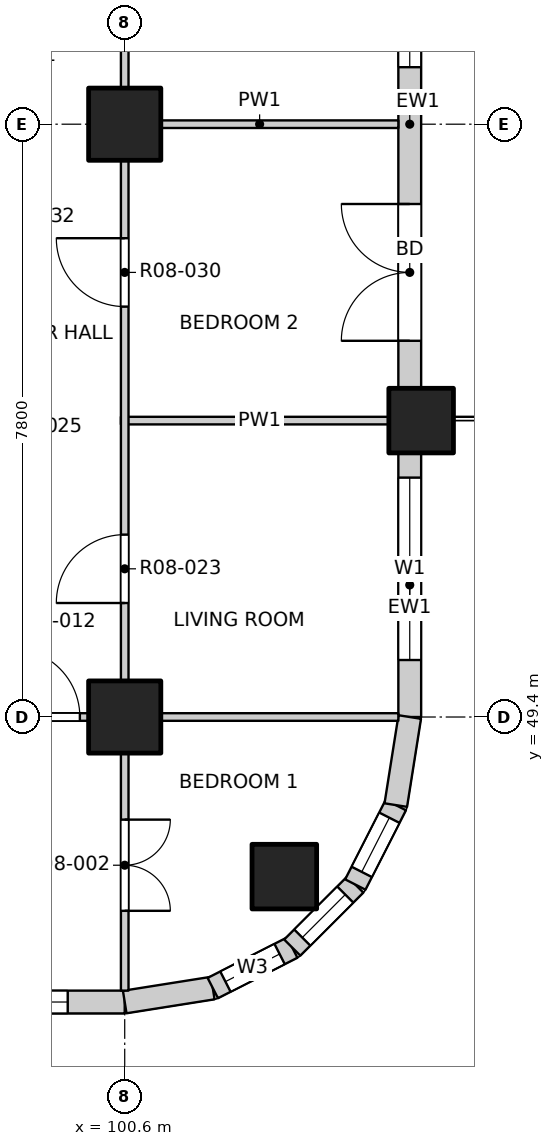
"""IFC4 building model, lengths in metres.
Left out: names, types, materials, properties, quantities, classifications, styles, units other than length and angle.
Written with IfcOpenShell. Run it as: python <this file> out.ifc"""

import sys

from ifc_helpers import new_model, si_unit, direction, frame, frame_2d, origin, origin_2d, place, context, subcontext, project, spatial, rectangle, extrude, element, fill, save


model = new_model("IFC4")
c1 = context("Model", 3, precision=1e-05, world=origin(), true_north=direction((0.0, 1.0)))
c2 = subcontext(c1, "Body", "Model", "MODEL_VIEW")
j1 = project(units=[si_unit("LENGTHUNIT", "METRE"), si_unit("PLANEANGLEUNIT", "RADIAN")], contexts=[c1])
p1 = place(None, origin())
s1 = spatial("IfcSite", under=j1, at=p1, CompositionType="ELEMENT")
p2 = place(p1, origin())
s2 = spatial("IfcBuilding", under=s1, at=p2, CompositionType="ELEMENT")
p3 = place(p2, frame((0.0, 0.0, 103.3)))
s3 = spatial("IfcBuildingStorey", under=s2, at=p3, CompositionType="ELEMENT", Elevation=103.3)
for number, where, z_axis, x_axis in (
    (1, (102.7, 47.3, -0.25), (0.0, 0.0, 1.0), (1.0, 0.0, 0.0)),
    (2, (104.5, 53.3, -0.25), (0.0, 0.0, 1.0), (1.0, 0.0, 0.0)),
):
    element("IfcColumn", number, at=place(p3, frame(where, z_axis=z_axis, x_axis=x_axis)), inside=s3, PredefinedType="COLUMN", context=c2, shape_type="SweptSolid", body=[
        extrude(rectangle(XDim=0.85, YDim=0.85, at=origin_2d()), origin(), (0.0, 0.0, 1.0), 3.4),
    ])
for number, where, z_axis, x_axis in (
    (3, (100.6, 49.4, -0.25), (0.0, 0.0, 1.0), (1.0, 0.0, 0.0)),
    (4, (100.6, 57.2, -0.25), (0.0, 0.0, 1.0), (1.0, 0.0, 0.0)),
):
    element("IfcColumn", number, at=place(p3, frame(where, z_axis=z_axis, x_axis=x_axis)), inside=s3, PredefinedType="COLUMN", context=c2, shape_type="SweptSolid", body=[
        extrude(rectangle(XDim=0.95, YDim=0.95, at=origin_2d()), origin(), (0.0, 0.0, 1.0), 3.4),
    ])
p4 = place(p3, frame((97.125, 45.65, 0.0), z_axis=(0.0, 0.0, 1.0), x_axis=(1.0, 0.0, 0.0)))
e5 = element("IfcWall", 5, at=p4, inside=s3, PredefinedType="SOLIDWALL", context=c2, shape_type="SweptSolid", body=[
    extrude(rectangle(XDim=3.475, YDim=0.3, at=frame_2d((1.738, 0.0))), origin(), (0.0, 0.0, 1.0), 2.7),
])
p5 = place(p4, frame((0.325, 0.0, 0.9)))
e6 = element("IfcOpeningElement", 6, at=p5, cuts=e5, PredefinedType="OPENING", context=c2, shape_type="SweptSolid", body=[
    extrude(rectangle(XDim=2.4, YDim=1.8, at=frame_2d((1.2, 0.9))), frame((0.0, 0.16, 0.0), z_axis=(0.0, -1.0, 0.0), x_axis=(1.0, 0.0, 0.0)), (0.0, 0.0, 1.0), 0.32),
])
p6 = place(p3, frame((104.35, 49.4, 0.0), z_axis=(0.0, 0.0, 1.0), x_axis=(0.0, 1.0, 0.0)))
e7 = element("IfcWall", 7, at=p6, inside=s3, PredefinedType="SOLIDWALL", context=c2, shape_type="SweptSolid", body=[
    extrude(rectangle(XDim=3.475, YDim=0.3, at=frame_2d((1.738, 0.0))), origin(), (0.0, 0.0, 1.0), 2.7),
])
p7 = place(p6, frame((0.75, 0.0, 0.9)))
e8 = element("IfcOpeningElement", 8, at=p7, cuts=e7, PredefinedType="OPENING", context=c2, shape_type="SweptSolid", body=[
    extrude(rectangle(XDim=2.4, YDim=1.8, at=frame_2d((1.2, 0.9))), frame((0.0, 0.16, 0.0), z_axis=(0.0, -1.0, 0.0), x_axis=(1.0, 0.0, 0.0)), (0.0, 0.0, 1.0), 0.32),
])
p8 = place(p3, frame((104.35, 53.725, 0.0), z_axis=(0.0, 0.0, 1.0), x_axis=(0.0, 1.0, 0.0)))
e9 = element("IfcWall", 9, at=p8, inside=s3, PredefinedType="SOLIDWALL", context=c2, shape_type="SweptSolid", body=[
    extrude(rectangle(XDim=6.95, YDim=0.3, at=frame_2d((3.475, 0.0))), origin(), (0.0, 0.0, 1.0), 2.7),
])
p9 = place(p8, frame((0.625, 0.0, 0.0)))
e10 = element("IfcOpeningElement", 10, at=p9, cuts=e9, PredefinedType="OPENING", context=c2, shape_type="SweptSolid", body=[
    extrude(rectangle(XDim=1.8, YDim=2.4, at=frame_2d((0.9, 1.2))), frame((0.0, 0.16, 0.0), z_axis=(0.0, -1.0, 0.0), x_axis=(1.0, 0.0, 0.0)), (0.0, 0.0, 1.0), 0.32),
])
p10 = place(p8, frame((4.225, 0.0, 0.9)))
e11 = element("IfcOpeningElement", 11, at=p10, cuts=e9, PredefinedType="OPENING", context=c2, shape_type="SweptSolid", body=[
    extrude(rectangle(XDim=2.4, YDim=1.8, at=frame_2d((1.2, 0.9))), frame((0.0, 0.16, 0.0), z_axis=(0.0, -1.0, 0.0), x_axis=(1.0, 0.0, 0.0)), (0.0, 0.0, 1.0), 0.32),
])
p11 = place(p3, frame((100.6, 45.65, 0.0), z_axis=(0.0, 0.0, 1.0), x_axis=(0.987678452879, 0.156496880861, 0.0)))
e12 = element("IfcWall", 12, at=p11, inside=s3, PredefinedType="SOLIDWALL", context=c2, shape_type="SweptSolid", body=[
    extrude(rectangle(XDim=1.173, YDim=0.3, at=frame_2d((0.586, 0.0))), origin(), (0.0, 0.0, 1.0), 2.7),
])
p12 = place(p3, frame((101.759, 45.833, 0.0), z_axis=(0.0, 0.0, 1.0), x_axis=(0.890988677504, 0.454025524128, 0.0)))
e13 = element("IfcWall", 13, at=p12, inside=s3, PredefinedType="SOLIDWALL", context=c2, shape_type="SweptSolid", body=[
    extrude(rectangle(XDim=1.173, YDim=0.3, at=frame_2d((0.587, 0.0))), origin(), (0.0, 0.0, 1.0), 2.7),
])
p13 = place(p12, frame((0.187, 0.0, 0.9)))
e14 = element("IfcOpeningElement", 14, at=p13, cuts=e13, PredefinedType="OPENING", context=c2, shape_type="SweptSolid", body=[
    extrude(rectangle(XDim=0.8, YDim=1.2, at=frame_2d((0.4, 0.6))), frame((0.0, 0.16, 0.0), z_axis=(0.0, -1.0, 0.0), x_axis=(1.0, 0.0, 0.0)), (0.0, 0.0, 1.0), 0.32),
])
p14 = place(p3, frame((102.804, 46.366, 0.0), z_axis=(0.0, 0.0, 1.0), x_axis=(0.707106781187, 0.707106781187, 0.0)))
e15 = element("IfcWall", 15, at=p14, inside=s3, PredefinedType="SOLIDWALL", context=c2, shape_type="SweptSolid", body=[
    extrude(rectangle(XDim=1.173, YDim=0.3, at=frame_2d((0.586, 0.0))), origin(), (0.0, 0.0, 1.0), 2.7),
])
p15 = place(p14, frame((0.187, 0.0, 0.9)))
e16 = element("IfcOpeningElement", 16, at=p15, cuts=e15, PredefinedType="OPENING", context=c2, shape_type="SweptSolid", body=[
    extrude(rectangle(XDim=0.8, YDim=1.2, at=frame_2d((0.4, 0.6))), frame((0.0, 0.16, 0.0), z_axis=(0.0, -1.0, 0.0), x_axis=(1.0, 0.0, 0.0)), (0.0, 0.0, 1.0), 0.32),
])
p16 = place(p3, frame((103.634, 47.196, 0.0), z_axis=(0.0, 0.0, 1.0), x_axis=(0.454025524128, 0.890988677504, 0.0)))
e17 = element("IfcWall", 17, at=p16, inside=s3, PredefinedType="SOLIDWALL", context=c2, shape_type="SweptSolid", body=[
    extrude(rectangle(XDim=1.173, YDim=0.3, at=frame_2d((0.587, 0.0))), origin(), (0.0, 0.0, 1.0), 2.7),
])
p17 = place(p16, frame((0.187, 0.0, 0.9)))
e18 = element("IfcOpeningElement", 18, at=p17, cuts=e17, PredefinedType="OPENING", context=c2, shape_type="SweptSolid", body=[
    extrude(rectangle(XDim=0.8, YDim=1.2, at=frame_2d((0.4, 0.6))), frame((0.0, 0.16, 0.0), z_axis=(0.0, -1.0, 0.0), x_axis=(1.0, 0.0, 0.0)), (0.0, 0.0, 1.0), 0.32),
])
p18 = place(p3, frame((104.167, 48.241, 0.0), z_axis=(0.0, 0.0, 1.0), x_axis=(0.156496880861, 0.987678452879, 0.0)))
e19 = element("IfcWall", 19, at=p18, inside=s3, PredefinedType="SOLIDWALL", context=c2, shape_type="SweptSolid", body=[
    extrude(rectangle(XDim=1.173, YDim=0.3, at=frame_2d((0.586, 0.0))), origin(), (0.0, 0.0, 1.0), 2.7),
])
p19 = place(p3, frame((65.8, 49.4, 0.0), z_axis=(0.0, 0.0, 1.0), x_axis=(1.0, 0.0, 0.0)))
e20 = element("IfcWall", 20, at=p19, inside=s3, PredefinedType="PARTITIONING", context=c2, shape_type="SweptSolid", body=[
    extrude(rectangle(XDim=38.4, YDim=0.1, at=frame_2d((19.2, 0.0))), origin(), (0.0, 0.0, 1.0), 3.15),
])
p20 = place(p19, frame((4.19, 0.0, 0.0)))
e21 = element("IfcOpeningElement", 21, at=p20, cuts=e20, PredefinedType="OPENING", context=c2, shape_type="SweptSolid", body=[
    extrude(rectangle(XDim=0.9, YDim=2.1, at=frame_2d((0.45, 1.05))), frame((0.0, 0.06, 0.0), z_axis=(0.0, -1.0, 0.0), x_axis=(1.0, 0.0, 0.0)), (0.0, 0.0, 1.0), 0.12),
])
p21 = place(p19, frame((9.0, 0.0, 0.0)))
e22 = element("IfcOpeningElement", 22, at=p21, cuts=e20, PredefinedType="OPENING", context=c2, shape_type="SweptSolid", body=[
    extrude(rectangle(XDim=0.9, YDim=2.1, at=frame_2d((0.45, 1.05))), frame((0.0, 0.06, 0.0), z_axis=(0.0, -1.0, 0.0), x_axis=(1.0, 0.0, 0.0)), (0.0, 0.0, 1.0), 0.12),
])
p22 = place(p19, frame((12.9, 0.0, 0.0)))
e23 = element("IfcOpeningElement", 23, at=p22, cuts=e20, PredefinedType="OPENING", context=c2, shape_type="SweptSolid", body=[
    extrude(rectangle(XDim=0.9, YDim=2.1, at=frame_2d((0.45, 1.05))), frame((0.0, 0.06, 0.0), z_axis=(0.0, -1.0, 0.0), x_axis=(1.0, 0.0, 0.0)), (0.0, 0.0, 1.0), 0.12),
])
p23 = place(p19, frame((16.8, 0.0, 0.0)))
e24 = element("IfcOpeningElement", 24, at=p23, cuts=e20, PredefinedType="OPENING", context=c2, shape_type="SweptSolid", body=[
    extrude(rectangle(XDim=0.9, YDim=2.1, at=frame_2d((0.45, 1.05))), frame((0.0, 0.06, 0.0), z_axis=(0.0, -1.0, 0.0), x_axis=(1.0, 0.0, 0.0)), (0.0, 0.0, 1.0), 0.12),
])
p24 = place(p19, frame((20.7, 0.0, 0.0)))
e25 = element("IfcOpeningElement", 25, at=p24, cuts=e20, PredefinedType="OPENING", context=c2, shape_type="SweptSolid", body=[
    extrude(rectangle(XDim=0.9, YDim=2.1, at=frame_2d((0.45, 1.05))), frame((0.0, 0.06, 0.0), z_axis=(0.0, -1.0, 0.0), x_axis=(1.0, 0.0, 0.0)), (0.0, 0.0, 1.0), 0.12),
])
p25 = place(p19, frame((24.6, 0.0, 0.0)))
e26 = element("IfcOpeningElement", 26, at=p25, cuts=e20, PredefinedType="OPENING", context=c2, shape_type="SweptSolid", body=[
    extrude(rectangle(XDim=0.9, YDim=2.1, at=frame_2d((0.45, 1.05))), frame((0.0, 0.06, 0.0), z_axis=(0.0, -1.0, 0.0), x_axis=(1.0, 0.0, 0.0)), (0.0, 0.0, 1.0), 0.12),
])
p26 = place(p19, frame((28.5, 0.0, 0.0)))
e27 = element("IfcOpeningElement", 27, at=p26, cuts=e20, PredefinedType="OPENING", context=c2, shape_type="SweptSolid", body=[
    extrude(rectangle(XDim=0.9, YDim=2.1, at=frame_2d((0.45, 1.05))), frame((0.0, 0.06, 0.0), z_axis=(0.0, -1.0, 0.0), x_axis=(1.0, 0.0, 0.0)), (0.0, 0.0, 1.0), 0.12),
])
p27 = place(p19, frame((33.31, 0.0, 0.0)))
e28 = element("IfcOpeningElement", 28, at=p27, cuts=e20, PredefinedType="OPENING", context=c2, shape_type="SweptSolid", body=[
    extrude(rectangle(XDim=0.9, YDim=2.1, at=frame_2d((0.45, 1.05))), frame((0.0, 0.06, 0.0), z_axis=(0.0, -1.0, 0.0), x_axis=(1.0, 0.0, 0.0)), (0.0, 0.0, 1.0), 0.12),
])
for number, where, z_axis, x_axis in (
    (29, (100.55, 53.3, 0.0), (0.0, 0.0, 1.0), (1.0, 0.0, 0.0)),
    (30, (100.55, 57.2, 0.0), (0.0, 0.0, 1.0), (1.0, 0.0, 0.0)),
):
    element("IfcWall", number, at=place(p3, frame(where, z_axis=z_axis, x_axis=x_axis)), inside=s3, PredefinedType="PARTITIONING", context=c2, shape_type="SweptSolid", body=[
        extrude(rectangle(XDim=3.65, YDim=0.1, at=frame_2d((1.825, 0.0))), origin(), (0.0, 0.0, 1.0), 3.15),
    ])
p28 = place(p3, frame((100.6, 45.8, 0.0), z_axis=(0.0, 0.0, 1.0), x_axis=(0.0, 1.0, 0.0)))
e31 = element("IfcWall", 31, at=p28, inside=s3, PredefinedType="PARTITIONING", context=c2, shape_type="SweptSolid", body=[
    extrude(rectangle(XDim=38.4, YDim=0.1, at=frame_2d((19.2, 0.0))), origin(), (0.0, 0.0, 1.0), 3.15),
])
p29 = place(p28, frame((1.05, 0.0, 0.0)))
e32 = element("IfcOpeningElement", 32, at=p29, cuts=e31, PredefinedType="OPENING", context=c2, shape_type="SweptSolid", body=[
    extrude(rectangle(XDim=1.2, YDim=2.1, at=frame_2d((0.6, 1.05))), frame((0.0, 0.06, 0.0), z_axis=(0.0, -1.0, 0.0), x_axis=(1.0, 0.0, 0.0)), (0.0, 0.0, 1.0), 0.12),
])
p30 = place(p28, frame((5.1, 0.0, 0.0)))
e33 = element("IfcOpeningElement", 33, at=p30, cuts=e31, PredefinedType="OPENING", context=c2, shape_type="SweptSolid", body=[
    extrude(rectangle(XDim=0.9, YDim=2.1, at=frame_2d((0.45, 1.05))), frame((0.0, 0.06, 0.0), z_axis=(0.0, -1.0, 0.0), x_axis=(1.0, 0.0, 0.0)), (0.0, 0.0, 1.0), 0.12),
])
p31 = place(p28, frame((9.0, 0.0, 0.0)))
e34 = element("IfcOpeningElement", 34, at=p31, cuts=e31, PredefinedType="OPENING", context=c2, shape_type="SweptSolid", body=[
    extrude(rectangle(XDim=0.9, YDim=2.1, at=frame_2d((0.45, 1.05))), frame((0.0, 0.06, 0.0), z_axis=(0.0, -1.0, 0.0), x_axis=(1.0, 0.0, 0.0)), (0.0, 0.0, 1.0), 0.12),
])
p32 = place(p28, frame((12.9, 0.0, 0.0)))
e35 = element("IfcOpeningElement", 35, at=p32, cuts=e31, PredefinedType="OPENING", context=c2, shape_type="SweptSolid", body=[
    extrude(rectangle(XDim=0.9, YDim=2.1, at=frame_2d((0.45, 1.05))), frame((0.0, 0.06, 0.0), z_axis=(0.0, -1.0, 0.0), x_axis=(1.0, 0.0, 0.0)), (0.0, 0.0, 1.0), 0.12),
])
p33 = place(p28, frame((16.8, 0.0, 0.0)))
e36 = element("IfcOpeningElement", 36, at=p33, cuts=e31, PredefinedType="OPENING", context=c2, shape_type="SweptSolid", body=[
    extrude(rectangle(XDim=0.9, YDim=2.1, at=frame_2d((0.45, 1.05))), frame((0.0, 0.06, 0.0), z_axis=(0.0, -1.0, 0.0), x_axis=(1.0, 0.0, 0.0)), (0.0, 0.0, 1.0), 0.12),
])
p34 = place(p28, frame((20.7, 0.0, 0.0)))
e37 = element("IfcOpeningElement", 37, at=p34, cuts=e31, PredefinedType="OPENING", context=c2, shape_type="SweptSolid", body=[
    extrude(rectangle(XDim=0.9, YDim=2.1, at=frame_2d((0.45, 1.05))), frame((0.0, 0.06, 0.0), z_axis=(0.0, -1.0, 0.0), x_axis=(1.0, 0.0, 0.0)), (0.0, 0.0, 1.0), 0.12),
])
p35 = place(p28, frame((24.6, 0.0, 0.0)))
e38 = element("IfcOpeningElement", 38, at=p35, cuts=e31, PredefinedType="OPENING", context=c2, shape_type="SweptSolid", body=[
    extrude(rectangle(XDim=0.9, YDim=2.1, at=frame_2d((0.45, 1.05))), frame((0.0, 0.06, 0.0), z_axis=(0.0, -1.0, 0.0), x_axis=(1.0, 0.0, 0.0)), (0.0, 0.0, 1.0), 0.12),
])
p36 = place(p28, frame((28.5, 0.0, 0.0)))
e39 = element("IfcOpeningElement", 39, at=p36, cuts=e31, PredefinedType="OPENING", context=c2, shape_type="SweptSolid", body=[
    extrude(rectangle(XDim=0.9, YDim=2.1, at=frame_2d((0.45, 1.05))), frame((0.0, 0.06, 0.0), z_axis=(0.0, -1.0, 0.0), x_axis=(1.0, 0.0, 0.0)), (0.0, 0.0, 1.0), 0.12),
])
p37 = place(p28, frame((32.4, 0.0, 0.0)))
e40 = element("IfcOpeningElement", 40, at=p37, cuts=e31, PredefinedType="OPENING", context=c2, shape_type="SweptSolid", body=[
    extrude(rectangle(XDim=0.9, YDim=2.1, at=frame_2d((0.45, 1.05))), frame((0.0, 0.06, 0.0), z_axis=(0.0, -1.0, 0.0), x_axis=(1.0, 0.0, 0.0)), (0.0, 0.0, 1.0), 0.12),
])
p38 = place(p28, frame((36.15, 0.0, 0.0)))
e41 = element("IfcOpeningElement", 41, at=p38, cuts=e31, PredefinedType="OPENING", context=c2, shape_type="SweptSolid", body=[
    extrude(rectangle(XDim=1.2, YDim=2.1, at=frame_2d((0.6, 1.05))), frame((0.0, 0.06, 0.0), z_axis=(0.0, -1.0, 0.0), x_axis=(1.0, 0.0, 0.0)), (0.0, 0.0, 1.0), 0.12),
])
p39 = place(p5, origin())
e42 = element("IfcWindow", 42, at=p39, inside=s3, PartitioningType="DOUBLE_PANEL_VERTICAL", PredefinedType="WINDOW", context=c2, shape_type="SweptSolid", body=[
    extrude(rectangle(XDim=2.4, YDim=1.8, at=frame_2d((1.2, 0.9))), frame((0.0, 0.03, 0.0), z_axis=(0.0, -1.0, 0.0), x_axis=(1.0, 0.0, 0.0)), (0.0, 0.0, 1.0), 0.06),
])
fill(e6, e42)
p40 = place(p7, origin())
e43 = element("IfcWindow", 43, at=p40, inside=s3, PartitioningType="DOUBLE_PANEL_VERTICAL", PredefinedType="WINDOW", context=c2, shape_type="SweptSolid", body=[
    extrude(rectangle(XDim=2.4, YDim=1.8, at=frame_2d((1.2, 0.9))), frame((0.0, 0.03, 0.0), z_axis=(0.0, -1.0, 0.0), x_axis=(1.0, 0.0, 0.0)), (0.0, 0.0, 1.0), 0.06),
])
fill(e8, e43)
p41 = place(p9, origin())
e44 = element("IfcDoor", 44, at=p41, inside=s3, OperationType="DOUBLE_DOOR_SINGLE_SWING", PredefinedType="DOOR", context=c2, shape_type="SweptSolid", body=[
    extrude(rectangle(XDim=1.8, YDim=2.4, at=frame_2d((0.9, 1.2))), frame((0.0, 0.025, 0.0), z_axis=(0.0, -1.0, 0.0), x_axis=(1.0, 0.0, 0.0)), (0.0, 0.0, 1.0), 0.05),
])
fill(e10, e44)
p42 = place(p10, origin())
e45 = element("IfcWindow", 45, at=p42, inside=s3, PartitioningType="DOUBLE_PANEL_VERTICAL", PredefinedType="WINDOW", context=c2, shape_type="SweptSolid", body=[
    extrude(rectangle(XDim=2.4, YDim=1.8, at=frame_2d((1.2, 0.9))), frame((0.0, 0.03, 0.0), z_axis=(0.0, -1.0, 0.0), x_axis=(1.0, 0.0, 0.0)), (0.0, 0.0, 1.0), 0.06),
])
fill(e11, e45)
p43 = place(p13, origin())
e46 = element("IfcWindow", 46, at=p43, inside=s3, PartitioningType="SINGLE_PANEL", PredefinedType="WINDOW", context=c2, shape_type="SweptSolid", body=[
    extrude(rectangle(XDim=0.8, YDim=1.2, at=frame_2d((0.4, 0.6))), frame((0.0, 0.03, 0.0), z_axis=(0.0, -1.0, 0.0), x_axis=(1.0, 0.0, 0.0)), (0.0, 0.0, 1.0), 0.06),
])
fill(e14, e46)
p44 = place(p15, origin())
e47 = element("IfcWindow", 47, at=p44, inside=s3, PartitioningType="SINGLE_PANEL", PredefinedType="WINDOW", context=c2, shape_type="SweptSolid", body=[
    extrude(rectangle(XDim=0.8, YDim=1.2, at=frame_2d((0.4, 0.6))), frame((0.0, 0.03, 0.0), z_axis=(0.0, -1.0, 0.0), x_axis=(1.0, 0.0, 0.0)), (0.0, 0.0, 1.0), 0.06),
])
fill(e16, e47)
p45 = place(p17, origin())
e48 = element("IfcWindow", 48, at=p45, inside=s3, PartitioningType="SINGLE_PANEL", PredefinedType="WINDOW", context=c2, shape_type="SweptSolid", body=[
    extrude(rectangle(XDim=0.8, YDim=1.2, at=frame_2d((0.4, 0.6))), frame((0.0, 0.03, 0.0), z_axis=(0.0, -1.0, 0.0), x_axis=(1.0, 0.0, 0.0)), (0.0, 0.0, 1.0), 0.06),
])
fill(e18, e48)
p46 = place(p29, origin())
e49 = element("IfcDoor", 49, at=p46, inside=s3, OperationType="DOUBLE_DOOR_SINGLE_SWING", PredefinedType="DOOR", context=c2, shape_type="SweptSolid", body=[
    extrude(rectangle(XDim=1.2, YDim=2.1, at=frame_2d((0.6, 1.05))), frame((0.0, 0.025, 0.0), z_axis=(0.0, -1.0, 0.0), x_axis=(1.0, 0.0, 0.0)), (0.0, 0.0, 1.0), 0.05),
])
fill(e32, e49)
p47 = place(p27, origin())
e50 = element("IfcDoor", 50, at=p47, inside=s3, OperationType="SINGLE_SWING_LEFT", PredefinedType="DOOR", context=c2, shape_type="SweptSolid", body=[
    extrude(rectangle(XDim=0.9, YDim=2.1, at=frame_2d((0.45, 1.05))), frame((0.0, 0.025, 0.0), z_axis=(0.0, -1.0, 0.0), x_axis=(1.0, 0.0, 0.0)), (0.0, 0.0, 1.0), 0.05),
])
fill(e28, e50)
p48 = place(p30, origin())
e51 = element("IfcDoor", 51, at=p48, inside=s3, OperationType="SINGLE_SWING_LEFT", PredefinedType="DOOR", context=c2, shape_type="SweptSolid", body=[
    extrude(rectangle(XDim=0.9, YDim=2.1, at=frame_2d((0.45, 1.05))), frame((0.0, 0.025, 0.0), z_axis=(0.0, -1.0, 0.0), x_axis=(1.0, 0.0, 0.0)), (0.0, 0.0, 1.0), 0.05),
])
fill(e33, e51)
p49 = place(p31, origin())
e52 = element("IfcDoor", 52, at=p49, inside=s3, OperationType="SINGLE_SWING_RIGHT", PredefinedType="DOOR", context=c2, shape_type="SweptSolid", body=[
    extrude(rectangle(XDim=0.9, YDim=2.1, at=frame_2d((0.45, 1.05))), frame((0.0, 0.025, 0.0), z_axis=(0.0, -1.0, 0.0), x_axis=(1.0, 0.0, 0.0)), (0.0, 0.0, 1.0), 0.05),
])
fill(e34, e52)
save(model, sys.argv[1])
